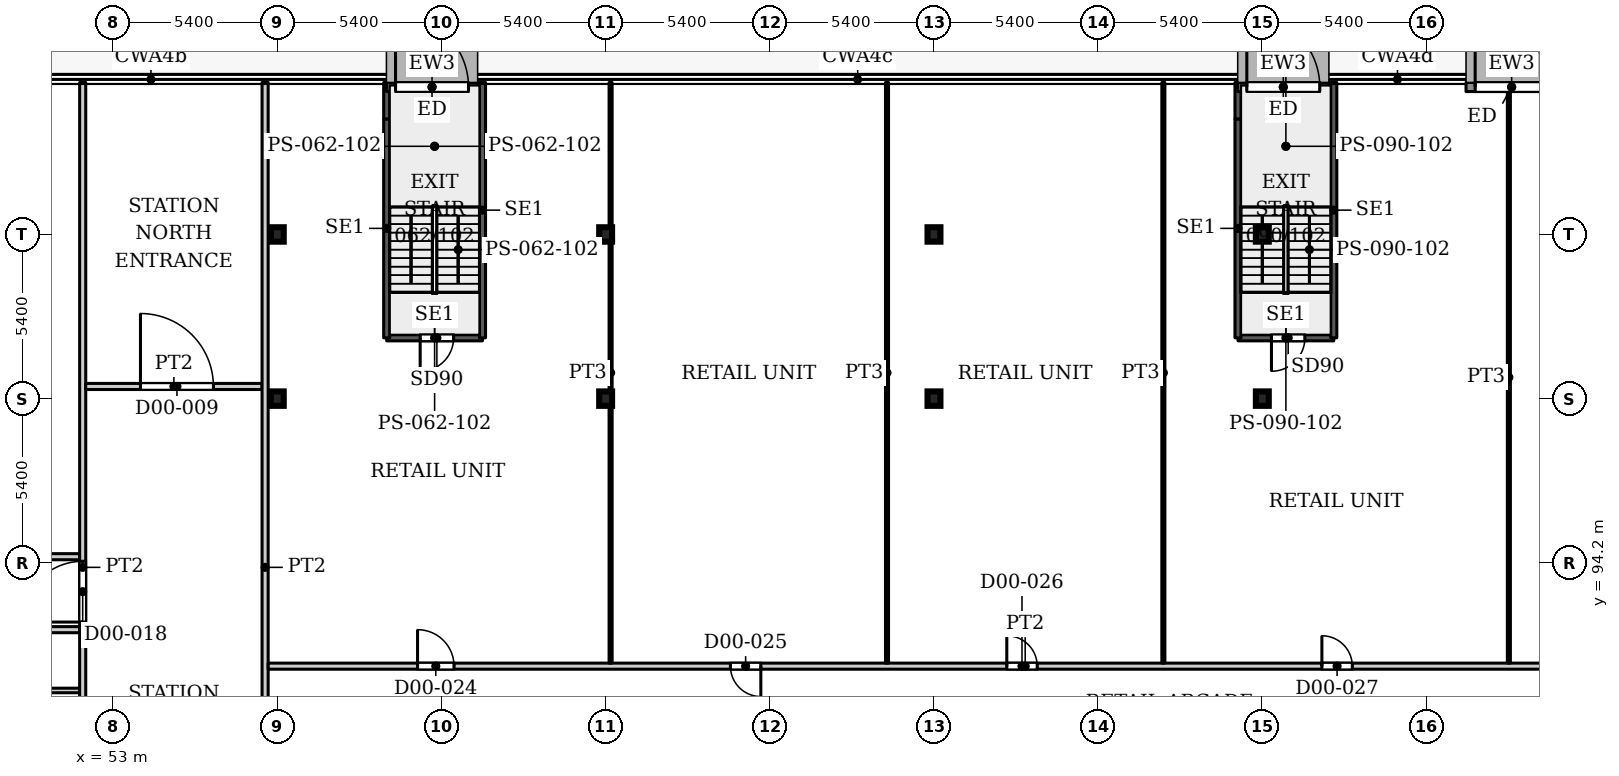
"""IFC4 building model, lengths in metres.
Left out: names, types, materials, properties, quantities, classifications, styles, units other than length and angle.
Written with IfcOpenShell. Run it as: python <this file> out.ifc"""

import sys

from ifc_helpers import new_model, si_unit, direction, frame, frame_2d, origin, origin_2d, place, context, subcontext, project, spatial, rectangle, i_section, extrude, source, transform, mapped, element, fill, save


model = new_model("IFC4")
c1 = context("Model", 3, precision=1e-05, world=origin(), true_north=direction((0.0, 1.0)))
c2 = subcontext(c1, "Body", "Model", "MODEL_VIEW")
j1 = project(units=[si_unit("LENGTHUNIT", "METRE"), si_unit("PLANEANGLEUNIT", "RADIAN")], contexts=[c1])
p1 = place(None, origin())
s1 = spatial("IfcSite", under=j1, at=p1, CompositionType="ELEMENT")
p2 = place(p1, origin())
s2 = spatial("IfcBuilding", under=s1, at=p2, CompositionType="ELEMENT")
p3 = place(p2, origin())
s3 = spatial("IfcBuildingStorey", under=s2, at=p3, CompositionType="ELEMENT", Elevation=0.0)
for number, where, z_axis, x_axis in (
    (1, (58.4, 99.6, 0.0), (0.0, 0.0, 1.0), (1.0, 0.0, 0.0)),
    (2, (69.2, 99.6, 0.0), (0.0, 0.0, 1.0), (1.0, 0.0, 0.0)),
    (3, (80.0, 99.6, 0.0), (0.0, 0.0, 1.0), (1.0, 0.0, 0.0)),
    (4, (90.8, 99.6, 0.0), (0.0, 0.0, 1.0), (1.0, 0.0, 0.0)),
    (5, (58.4, 105.0, 0.0), (0.0, 0.0, 1.0), (1.0, 0.0, 0.0)),
    (6, (69.2, 105.0, 0.0), (0.0, 0.0, 1.0), (1.0, 0.0, 0.0)),
    (7, (80.0, 105.0, 0.0), (0.0, 0.0, 1.0), (1.0, 0.0, 0.0)),
    (8, (90.8, 105.0, 0.0), (0.0, 0.0, 1.0), (1.0, 0.0, 0.0)),
):
    element("IfcColumn", number, at=place(p3, frame(where, z_axis=z_axis, x_axis=x_axis)), inside=s3, PredefinedType="COLUMN", context=c2, shape_type="SweptSolid", body=[
        extrude(i_section(OverallWidth=0.424, OverallDepth=0.474, WebThickness=0.048, FlangeThickness=0.077, FilletRadius=0.014, at=origin_2d()), origin(), (0.0, 0.0, 1.0), 7.5),
    ])
p4 = place(p3, frame((61.99, 109.85, 0.0), z_axis=(0.0, 0.0, 1.0), x_axis=(1.0, 0.0, 0.0)))
e9 = element("IfcWall", 9, at=p4, inside=s3, PredefinedType="SOLIDWALL", context=c2, shape_type="SweptSolid", body=[
    extrude(rectangle(XDim=3.0, YDim=0.3, at=frame_2d((1.5, 0.0))), origin(), (0.0, 0.0, 1.0), 7.25),
])
p5 = place(p4, frame((0.3, 0.0, 0.0)))
e10 = element("IfcOpeningElement", 10, at=p5, cuts=e9, PredefinedType="OPENING", context=c2, shape_type="SweptSolid", body=[
    extrude(rectangle(XDim=2.4, YDim=2.7, at=frame_2d((1.2, 1.35))), frame((0.0, 0.16, 0.0), z_axis=(0.0, -1.0, 0.0), x_axis=(1.0, 0.0, 0.0)), (0.0, 0.0, 1.0), 0.32),
])
p6 = place(p3, frame((89.99, 109.85, 0.0), z_axis=(0.0, 0.0, 1.0), x_axis=(1.0, 0.0, 0.0)))
e11 = element("IfcWall", 11, at=p6, inside=s3, PredefinedType="SOLIDWALL", context=c2, shape_type="SweptSolid", body=[
    extrude(rectangle(XDim=3.0, YDim=0.3, at=frame_2d((1.5, 0.0))), origin(), (0.0, 0.0, 1.0), 7.25),
])
p7 = place(p6, frame((0.3, 0.0, 0.0)))
e12 = element("IfcOpeningElement", 12, at=p7, cuts=e11, PredefinedType="OPENING", context=c2, shape_type="SweptSolid", body=[
    extrude(rectangle(XDim=2.4, YDim=2.7, at=frame_2d((1.2, 1.35))), frame((0.0, 0.16, 0.0), z_axis=(0.0, -1.0, 0.0), x_axis=(1.0, 0.0, 0.0)), (0.0, 0.0, 1.0), 0.32),
])
p8 = place(p3, frame((97.5, 109.85, 0.0), z_axis=(0.0, 0.0, 1.0), x_axis=(1.0, 0.0, 0.0)))
e13 = element("IfcWall", 13, at=p8, inside=s3, PredefinedType="SOLIDWALL", context=c2, shape_type="SweptSolid", body=[
    extrude(rectangle(XDim=3.0, YDim=0.3, at=frame_2d((1.5, 0.0))), origin(), (0.0, 0.0, 1.0), 7.25),
])
p9 = place(p8, frame((0.3, 0.0, 0.0)))
e14 = element("IfcOpeningElement", 14, at=p9, cuts=e13, PredefinedType="OPENING", context=c2, shape_type="SweptSolid", body=[
    extrude(rectangle(XDim=2.4, YDim=2.7, at=frame_2d((1.2, 1.35))), frame((0.0, 0.16, 0.0), z_axis=(0.0, -1.0, 0.0), x_axis=(1.0, 0.0, 0.0)), (0.0, 0.0, 1.0), 0.32),
])
p10 = place(p3, frame((62.0, 101.6, 0.0), z_axis=(0.0, 0.0, 1.0), x_axis=(1.0, 0.0, 0.0)))
e15 = element("IfcWall", 15, at=p10, inside=s3, PredefinedType="SHEAR", context=c2, shape_type="SweptSolid", body=[
    extrude(rectangle(XDim=3.15, YDim=0.2, at=frame_2d((1.575, 0.0))), origin(), (0.0, 0.0, 1.0), 7.5),
])
p11 = place(p10, frame((1.1, 0.0, 0.0)))
e16 = element("IfcOpeningElement", 16, at=p11, cuts=e15, PredefinedType="OPENING", context=c2, shape_type="SweptSolid", body=[
    extrude(rectangle(XDim=1.1, YDim=2.2, at=frame_2d((0.55, 1.1))), frame((0.0, 0.11, 0.0), z_axis=(0.0, -1.0, 0.0), x_axis=(1.0, 0.0, 0.0)), (0.0, 0.0, 1.0), 0.22),
])
p12 = place(p3, frame((62.0, 101.6, 0.0), z_axis=(0.0, 0.0, 1.0), x_axis=(0.0, 1.0, 0.0)))
e17 = element("IfcWall", 17, at=p12, inside=s3, PredefinedType="SHEAR", context=c2, shape_type="SweptSolid", body=[
    extrude(rectangle(XDim=7.2, YDim=0.2, at=frame_2d((3.6, 0.0))), origin(), (0.0, 0.0, 1.0), 7.5),
])
p13 = place(p3, frame((62.0, 108.8, 0.0), z_axis=(0.0, 0.0, 1.0), x_axis=(0.0, 1.0, 0.0)))
e18 = element("IfcWall", 18, at=p13, inside=s3, PredefinedType="SHEAR", context=c2, shape_type="SweptSolid", body=[
    extrude(rectangle(XDim=1.2, YDim=0.2, at=frame_2d((0.6, 0.0))), origin(), (0.0, 0.0, 1.0), 7.5),
])
p14 = place(p3, frame((65.15, 101.6, 0.0), z_axis=(0.0, 0.0, 1.0), x_axis=(0.0, 1.0, 0.0)))
e19 = element("IfcWall", 19, at=p14, inside=s3, PredefinedType="SHEAR", context=c2, shape_type="SweptSolid", body=[
    extrude(rectangle(XDim=8.4, YDim=0.2, at=frame_2d((4.2, 0.0))), origin(), (0.0, 0.0, 1.0), 7.5),
])
p15 = place(p3, frame((90.0, 101.6, 0.0), z_axis=(0.0, 0.0, 1.0), x_axis=(1.0, 0.0, 0.0)))
e20 = element("IfcWall", 20, at=p15, inside=s3, PredefinedType="SHEAR", context=c2, shape_type="SweptSolid", body=[
    extrude(rectangle(XDim=3.15, YDim=0.2, at=frame_2d((1.575, 0.0))), origin(), (0.0, 0.0, 1.0), 7.5),
])
p16 = place(p15, frame((1.1, 0.0, 0.0)))
e21 = element("IfcOpeningElement", 21, at=p16, cuts=e20, PredefinedType="OPENING", context=c2, shape_type="SweptSolid", body=[
    extrude(rectangle(XDim=1.1, YDim=2.2, at=frame_2d((0.55, 1.1))), frame((0.0, 0.11, 0.0), z_axis=(0.0, -1.0, 0.0), x_axis=(1.0, 0.0, 0.0)), (0.0, 0.0, 1.0), 0.22),
])
p17 = place(p3, frame((90.0, 101.6, 0.0), z_axis=(0.0, 0.0, 1.0), x_axis=(0.0, 1.0, 0.0)))
e22 = element("IfcWall", 22, at=p17, inside=s3, PredefinedType="SHEAR", context=c2, shape_type="SweptSolid", body=[
    extrude(rectangle(XDim=7.2, YDim=0.2, at=frame_2d((3.6, 0.0))), origin(), (0.0, 0.0, 1.0), 7.5),
])
p18 = place(p3, frame((90.0, 108.8, 0.0), z_axis=(0.0, 0.0, 1.0), x_axis=(0.0, 1.0, 0.0)))
e23 = element("IfcWall", 23, at=p18, inside=s3, PredefinedType="SHEAR", context=c2, shape_type="SweptSolid", body=[
    extrude(rectangle(XDim=1.2, YDim=0.2, at=frame_2d((0.6, 0.0))), origin(), (0.0, 0.0, 1.0), 7.5),
])
p19 = place(p3, frame((93.15, 101.6, 0.0), z_axis=(0.0, 0.0, 1.0), x_axis=(0.0, 1.0, 0.0)))
e24 = element("IfcWall", 24, at=p19, inside=s3, PredefinedType="SHEAR", context=c2, shape_type="SweptSolid", body=[
    extrude(rectangle(XDim=8.4, YDim=0.2, at=frame_2d((4.2, 0.0))), origin(), (0.0, 0.0, 1.0), 7.5),
])
p20 = place(p3, frame((36.45, 92.0, 0.0), z_axis=(0.0, 0.0, 1.0), x_axis=(1.0, 0.0, 0.0)))
e25 = element("IfcWall", 25, at=p20, inside=s3, PredefinedType="PARTITIONING", context=c2, shape_type="SweptSolid", body=[
    extrude(rectangle(XDim=15.45, YDim=0.2, at=frame_2d((7.725, 0.0))), origin(), (0.0, 0.0, 1.0), 7.08),
])
p21 = place(p20, frame((3.9, 0.0, 0.0)))
e26 = element("IfcOpeningElement", 26, at=p21, cuts=e25, PredefinedType="OPENING", context=c2, shape_type="SweptSolid", body=[
    extrude(rectangle(XDim=1.0, YDim=2.1, at=frame_2d((0.5, 1.05))), frame((0.0, 0.11, 0.0), z_axis=(0.0, -1.0, 0.0), x_axis=(1.0, 0.0, 0.0)), (0.0, 0.0, 1.0), 0.22),
])
p22 = place(p20, frame((11.783, 0.0, 0.0)))
e27 = element("IfcOpeningElement", 27, at=p22, cuts=e25, PredefinedType="OPENING", context=c2, shape_type="SweptSolid", body=[
    extrude(rectangle(XDim=1.0, YDim=2.1, at=frame_2d((0.5, 1.05))), frame((0.0, 0.11, 0.0), z_axis=(0.0, -1.0, 0.0), x_axis=(1.0, 0.0, 0.0)), (0.0, 0.0, 1.0), 0.22),
])
p23 = place(p3, frame((36.45, 94.4, 0.0), z_axis=(0.0, 0.0, 1.0), x_axis=(1.0, 0.0, 0.0)))
e28 = element("IfcWall", 28, at=p23, inside=s3, PredefinedType="PARTITIONING", context=c2, shape_type="SweptSolid", body=[
    extrude(rectangle(XDim=15.45, YDim=0.2, at=frame_2d((7.725, 0.0))), origin(), (0.0, 0.0, 1.0), 7.08),
])
p24 = place(p23, frame((0.567, 0.0, 0.0)))
e29 = element("IfcOpeningElement", 29, at=p24, cuts=e28, PredefinedType="OPENING", context=c2, shape_type="SweptSolid", body=[
    extrude(rectangle(XDim=1.0, YDim=2.1, at=frame_2d((0.5, 1.05))), frame((0.0, 0.11, 0.0), z_axis=(0.0, -1.0, 0.0), x_axis=(1.0, 0.0, 0.0)), (0.0, 0.0, 1.0), 0.22),
])
p25 = place(p23, frame((8.4, 0.0, 0.0)))
e30 = element("IfcOpeningElement", 30, at=p25, cuts=e28, PredefinedType="OPENING", context=c2, shape_type="SweptSolid", body=[
    extrude(rectangle(XDim=1.0, YDim=2.1, at=frame_2d((0.5, 1.05))), frame((0.0, 0.11, 0.0), z_axis=(0.0, -1.0, 0.0), x_axis=(1.0, 0.0, 0.0)), (0.0, 0.0, 1.0), 0.22),
])
p26 = place(p3, frame((48.075, 90.0, 0.0), z_axis=(0.0, 0.0, 1.0), x_axis=(1.0, 0.0, 0.0)))
e31 = element("IfcWall", 31, at=p26, inside=s3, PredefinedType="PARTITIONING", context=c2, shape_type="SweptSolid", body=[
    extrude(rectangle(XDim=3.825, YDim=0.15, at=frame_2d((1.913, 0.0))), origin(), (0.0, 0.0, 1.0), 7.08),
])
p27 = place(p3, frame((52.0, 78.1, 0.0), z_axis=(0.0, 0.0, 1.0), x_axis=(0.0, 1.0, 0.0)))
e32 = element("IfcWall", 32, at=p27, inside=s3, PredefinedType="PARTITIONING", context=c2, shape_type="SweptSolid", body=[
    extrude(rectangle(XDim=31.9, YDim=0.2, at=frame_2d((15.95, 0.0))), origin(), (0.0, 0.0, 1.0), 7.08),
])
p28 = place(p27, frame((14.15, 0.0, 0.0)))
e33 = element("IfcOpeningElement", 33, at=p28, cuts=e32, PredefinedType="OPENING", context=c2, shape_type="SweptSolid", body=[
    extrude(rectangle(XDim=2.0, YDim=2.1, at=frame_2d((1.0, 1.05))), frame((0.0, 0.11, 0.0), z_axis=(0.0, -1.0, 0.0), x_axis=(1.0, 0.0, 0.0)), (0.0, 0.0, 1.0), 0.22),
])
p29 = place(p27, frame((8.5, 0.0, 0.0)))
e34 = element("IfcOpeningElement", 34, at=p29, cuts=e32, PredefinedType="OPENING", context=c2, shape_type="SweptSolid", body=[
    extrude(rectangle(XDim=1.0, YDim=2.1, at=frame_2d((0.5, 1.05))), frame((0.0, 0.11, 0.0), z_axis=(0.0, -1.0, 0.0), x_axis=(1.0, 0.0, 0.0)), (0.0, 0.0, 1.0), 0.22),
])
p30 = place(p3, frame((52.1, 100.0, 0.0), z_axis=(0.0, 0.0, 1.0), x_axis=(1.0, 0.0, 0.0)))
e35 = element("IfcWall", 35, at=p30, inside=s3, PredefinedType="PARTITIONING", context=c2, shape_type="SweptSolid", body=[
    extrude(rectangle(XDim=5.8, YDim=0.2, at=frame_2d((2.9, 0.0))), origin(), (0.0, 0.0, 1.0), 7.08),
])
p31 = place(p30, frame((1.8, 0.0, 0.0)))
e36 = element("IfcOpeningElement", 36, at=p31, cuts=e35, PredefinedType="OPENING", context=c2, shape_type="SweptSolid", body=[
    extrude(rectangle(XDim=2.4, YDim=2.1, at=frame_2d((1.2, 1.05))), frame((0.0, 0.11, 0.0), z_axis=(0.0, -1.0, 0.0), x_axis=(1.0, 0.0, 0.0)), (0.0, 0.0, 1.0), 0.22),
])
p32 = place(p3, frame((58.0, 78.1, 0.0), z_axis=(0.0, 0.0, 1.0), x_axis=(0.0, 1.0, 0.0)))
e37 = element("IfcWall", 37, at=p32, inside=s3, PredefinedType="PARTITIONING", context=c2, shape_type="SweptSolid", body=[
    extrude(rectangle(XDim=31.9, YDim=0.2, at=frame_2d((15.95, 0.0))), origin(), (0.0, 0.0, 1.0), 7.08),
])
p33 = place(p32, frame((0.55, 0.0, 0.0)))
e38 = element("IfcOpeningElement", 38, at=p33, cuts=e37, PredefinedType="OPENING", context=c2, shape_type="SweptSolid", body=[
    extrude(rectangle(XDim=1.2, YDim=2.1, at=frame_2d((0.6, 1.05))), frame((0.0, 0.11, 0.0), z_axis=(0.0, -1.0, 0.0), x_axis=(1.0, 0.0, 0.0)), (0.0, 0.0, 1.0), 0.22),
])
p34 = place(p3, frame((58.1, 90.8, 0.0), z_axis=(0.0, 0.0, 1.0), x_axis=(1.0, 0.0, 0.0)))
e39 = element("IfcWall", 39, at=p34, inside=s3, PredefinedType="PARTITIONING", context=c2, shape_type="SweptSolid", body=[
    extrude(rectangle(XDim=49.8, YDim=0.2, at=frame_2d((24.9, 0.0))), origin(), (0.0, 0.0, 1.0), 7.08),
])
p35 = place(p34, frame((4.914, 0.0, 0.0)))
e40 = element("IfcOpeningElement", 40, at=p35, cuts=e39, PredefinedType="OPENING", context=c2, shape_type="SweptSolid", body=[
    extrude(rectangle(XDim=1.2, YDim=2.1, at=frame_2d((0.6, 1.05))), frame((0.0, 0.11, 0.0), z_axis=(0.0, -1.0, 0.0), x_axis=(1.0, 0.0, 0.0)), (0.0, 0.0, 1.0), 0.22),
])
p36 = place(p34, frame((15.205, 0.0, 0.0)))
e41 = element("IfcOpeningElement", 41, at=p36, cuts=e39, PredefinedType="OPENING", context=c2, shape_type="SweptSolid", body=[
    extrude(rectangle(XDim=1.0, YDim=2.1, at=frame_2d((0.5, 1.05))), frame((0.0, 0.11, 0.0), z_axis=(0.0, -1.0, 0.0), x_axis=(1.0, 0.0, 0.0)), (0.0, 0.0, 1.0), 0.22),
])
p37 = place(p34, frame((24.295, 0.0, 0.0)))
e42 = element("IfcOpeningElement", 42, at=p37, cuts=e39, PredefinedType="OPENING", context=c2, shape_type="SweptSolid", body=[
    extrude(rectangle(XDim=1.0, YDim=2.1, at=frame_2d((0.5, 1.05))), frame((0.0, 0.11, 0.0), z_axis=(0.0, -1.0, 0.0), x_axis=(1.0, 0.0, 0.0)), (0.0, 0.0, 1.0), 0.22),
])
p38 = place(p34, frame((34.659, 0.0, 0.0)))
e43 = element("IfcOpeningElement", 43, at=p38, cuts=e39, PredefinedType="OPENING", context=c2, shape_type="SweptSolid", body=[
    extrude(rectangle(XDim=1.0, YDim=2.1, at=frame_2d((0.5, 1.05))), frame((0.0, 0.11, 0.0), z_axis=(0.0, -1.0, 0.0), x_axis=(1.0, 0.0, 0.0)), (0.0, 0.0, 1.0), 0.22),
])
p39 = place(p34, frame((44.75, 0.0, 0.0)))
e44 = element("IfcOpeningElement", 44, at=p39, cuts=e39, PredefinedType="OPENING", context=c2, shape_type="SweptSolid", body=[
    extrude(rectangle(XDim=1.0, YDim=2.1, at=frame_2d((0.5, 1.05))), frame((0.0, 0.11, 0.0), z_axis=(0.0, -1.0, 0.0), x_axis=(1.0, 0.0, 0.0)), (0.0, 0.0, 1.0), 0.22),
])
for number, where, z_axis, x_axis in (
    (45, (69.364, 90.9, 0.0), (0.0, 0.0, 1.0), (0.0, 1.0, 0.0)),
    (46, (78.455, 90.9, 0.0), (0.0, 0.0, 1.0), (0.0, 1.0, 0.0)),
    (47, (87.545, 90.9, 0.0), (0.0, 0.0, 1.0), (0.0, 1.0, 0.0)),
):
    element("IfcWall", number, at=place(p3, frame(where, z_axis=z_axis, x_axis=x_axis)), inside=s3, PredefinedType="PARTITIONING", context=c2, shape_type="SweptSolid", body=[
        extrude(rectangle(XDim=19.1, YDim=0.1, at=frame_2d((9.55, 0.0))), origin(), (0.0, 0.0, 1.0), 7.08),
    ])
p40 = place(p3, frame((98.909, 90.9, 0.0), z_axis=(0.0, 0.0, 1.0), x_axis=(0.0, 1.0, 0.0)))
e48 = element("IfcWall", 48, at=p40, inside=s3, PredefinedType="PARTITIONING", context=c2, shape_type="SweptSolid", body=[
    extrude(rectangle(XDim=18.801, YDim=0.1, at=frame_2d((9.4, 0.0))), origin(), (0.0, 0.0, 1.0), 7.08),
])
m1 = source(origin(), c2, "Body", "SweptSolid", [
    extrude(rectangle(XDim=2.4, YDim=2.7, at=frame_2d((1.2, 1.35))), frame((0.0, 0.025, 0.0), z_axis=(0.0, -1.0, 0.0), x_axis=(1.0, 0.0, 0.0)), (0.0, 0.0, 1.0), 0.05),
])
p41 = place(p5, origin())
e49 = element("IfcDoor", 49, at=p41, inside=s3, OperationType="DOUBLE_DOOR_SINGLE_SWING", PredefinedType="DOOR", context=c2, shape_type="MappedRepresentation", body=[
    mapped(m1, transform((0.0, 0.0, 0.0), x_axis=(1.0, 0.0, 0.0), y_axis=(0.0, 1.0, 0.0), z_axis=(0.0, 0.0, 1.0), scale=1.0)),
])
fill(e10, e49)
p42 = place(p7, origin())
e50 = element("IfcDoor", 50, at=p42, inside=s3, OperationType="DOUBLE_DOOR_SINGLE_SWING", PredefinedType="DOOR", context=c2, shape_type="MappedRepresentation", body=[
    mapped(m1, transform((0.0, 0.0, 0.0), x_axis=(1.0, 0.0, 0.0), y_axis=(0.0, 1.0, 0.0), z_axis=(0.0, 0.0, 1.0), scale=1.0)),
])
fill(e12, e50)
p43 = place(p9, origin())
e51 = element("IfcDoor", 51, at=p43, inside=s3, OperationType="DOUBLE_DOOR_SINGLE_SWING", PredefinedType="DOOR", context=c2, shape_type="MappedRepresentation", body=[
    mapped(m1, transform((0.0, 0.0, 0.0), x_axis=(1.0, 0.0, 0.0), y_axis=(0.0, 1.0, 0.0), z_axis=(0.0, 0.0, 1.0), scale=1.0)),
])
fill(e14, e51)
m2 = source(origin(), c2, "Body", "SweptSolid", [
    extrude(rectangle(XDim=1.1, YDim=2.2, at=frame_2d((0.55, 1.1))), frame((0.0, 0.025, 0.0), z_axis=(0.0, -1.0, 0.0), x_axis=(1.0, 0.0, 0.0)), (0.0, 0.0, 1.0), 0.05),
])
p44 = place(p11, origin())
e52 = element("IfcDoor", 52, at=p44, inside=s3, OperationType="SINGLE_SWING_RIGHT", PredefinedType="DOOR", context=c2, shape_type="MappedRepresentation", body=[
    mapped(m2, transform((0.0, 0.0, 0.0), x_axis=(1.0, 0.0, 0.0), y_axis=(0.0, 1.0, 0.0), z_axis=(0.0, 0.0, 1.0), scale=1.0)),
])
fill(e16, e52)
p45 = place(p16, origin())
e53 = element("IfcDoor", 53, at=p45, inside=s3, OperationType="SINGLE_SWING_RIGHT", PredefinedType="DOOR", context=c2, shape_type="MappedRepresentation", body=[
    mapped(m2, transform((0.0, 0.0, 0.0), x_axis=(1.0, 0.0, 0.0), y_axis=(0.0, 1.0, 0.0), z_axis=(0.0, 0.0, 1.0), scale=1.0)),
])
fill(e21, e53)
m3 = source(origin(), c2, "Body", "SweptSolid", [
    extrude(rectangle(XDim=2.4, YDim=2.1, at=frame_2d((1.2, 1.05))), frame((0.0, 0.025, 0.0), z_axis=(0.0, -1.0, 0.0), x_axis=(1.0, 0.0, 0.0)), (0.0, 0.0, 1.0), 0.05),
])
p46 = place(p31, origin())
e54 = element("IfcDoor", 54, at=p46, inside=s3, OperationType="DOUBLE_DOOR_SINGLE_SWING", PredefinedType="DOOR", context=c2, shape_type="MappedRepresentation", body=[
    mapped(m3, transform((0.0, 0.0, 0.0), x_axis=(1.0, 0.0, 0.0), y_axis=(0.0, 1.0, 0.0), z_axis=(0.0, 0.0, 1.0), scale=1.0)),
])
fill(e36, e54)
m4 = source(origin(), c2, "Body", "SweptSolid", [
    extrude(rectangle(XDim=2.0, YDim=2.1, at=frame_2d((1.0, 1.05))), frame((0.0, 0.025, 0.0), z_axis=(0.0, -1.0, 0.0), x_axis=(1.0, 0.0, 0.0)), (0.0, 0.0, 1.0), 0.05),
])
p47 = place(p28, origin())
e55 = element("IfcDoor", 55, at=p47, inside=s3, OperationType="DOUBLE_DOOR_SINGLE_SWING", PredefinedType="DOOR", context=c2, shape_type="MappedRepresentation", body=[
    mapped(m4, transform((0.0, 0.0, 0.0), x_axis=(1.0, 0.0, 0.0), y_axis=(0.0, 1.0, 0.0), z_axis=(0.0, 0.0, 1.0), scale=1.0)),
])
fill(e33, e55)
m5 = source(origin(), c2, "Body", "SweptSolid", [
    extrude(rectangle(XDim=1.2, YDim=2.1, at=frame_2d((0.6, 1.05))), frame((0.0, 0.025, 0.0), z_axis=(0.0, -1.0, 0.0), x_axis=(1.0, 0.0, 0.0)), (0.0, 0.0, 1.0), 0.05),
])
p48 = place(p35, origin())
e56 = element("IfcDoor", 56, at=p48, inside=s3, OperationType="SINGLE_SWING_LEFT", PredefinedType="DOOR", context=c2, shape_type="MappedRepresentation", body=[
    mapped(m5, transform((0.0, 0.0, 0.0), x_axis=(1.0, 0.0, 0.0), y_axis=(0.0, 1.0, 0.0), z_axis=(0.0, 0.0, 1.0), scale=1.0)),
])
fill(e40, e56)
m6 = source(origin(), c2, "Body", "SweptSolid", [
    extrude(rectangle(XDim=1.0, YDim=2.1, at=frame_2d((0.5, 1.05))), frame((0.0, 0.025, 0.0), z_axis=(0.0, -1.0, 0.0), x_axis=(1.0, 0.0, 0.0)), (0.0, 0.0, 1.0), 0.05),
])
p49 = place(p36, origin())
e57 = element("IfcDoor", 57, at=p49, inside=s3, OperationType="SINGLE_SWING_RIGHT", PredefinedType="DOOR", context=c2, shape_type="MappedRepresentation", body=[
    mapped(m6, transform((0.0, 0.0, 0.0), x_axis=(1.0, 0.0, 0.0), y_axis=(0.0, 1.0, 0.0), z_axis=(0.0, 0.0, 1.0), scale=1.0)),
])
fill(e41, e57)
p50 = place(p37, origin())
e58 = element("IfcDoor", 58, at=p50, inside=s3, OperationType="SINGLE_SWING_LEFT", PredefinedType="DOOR", context=c2, shape_type="MappedRepresentation", body=[
    mapped(m6, transform((0.0, 0.0, 0.0), x_axis=(1.0, 0.0, 0.0), y_axis=(0.0, 1.0, 0.0), z_axis=(0.0, 0.0, 1.0), scale=1.0)),
])
fill(e42, e58)
p51 = place(p38, origin())
e59 = element("IfcDoor", 59, at=p51, inside=s3, OperationType="SINGLE_SWING_LEFT", PredefinedType="DOOR", context=c2, shape_type="MappedRepresentation", body=[
    mapped(m6, transform((0.0, 0.0, 0.0), x_axis=(1.0, 0.0, 0.0), y_axis=(0.0, 1.0, 0.0), z_axis=(0.0, 0.0, 1.0), scale=1.0)),
])
fill(e43, e59)
save(model, sys.argv[1])
